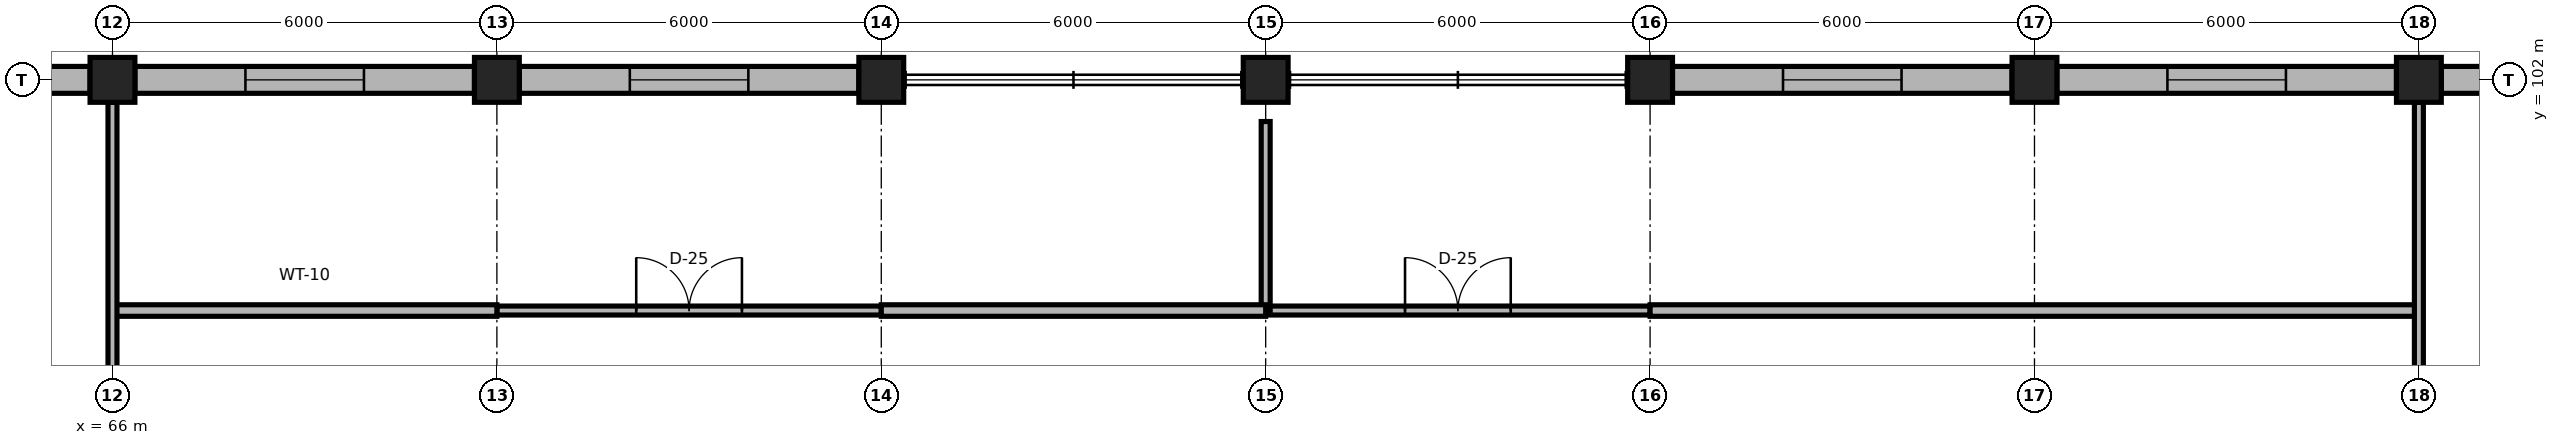
"""IFC4 building model, lengths in metres.
Left out: names, types, materials, properties, quantities, classifications, styles, units other than length and angle.
Written with IfcOpenShell. Run it as: python <this file> out.ifc"""

import sys

from ifc_helpers import new_model, si_unit, direction, frame, frame_2d, origin, origin_2d, place, context, subcontext, project, spatial, rectangle, extrude, element, fill, save


model = new_model("IFC4")
c1 = context("Model", 3, precision=1e-05, world=origin(), true_north=direction((0.0, 1.0)))
c2 = subcontext(c1, "Body", "Model", "MODEL_VIEW")
j1 = project(units=[si_unit("LENGTHUNIT", "METRE"), si_unit("PLANEANGLEUNIT", "RADIAN")], contexts=[c1])
p1 = place(None, origin())
s1 = spatial("IfcSite", under=j1, at=p1, CompositionType="ELEMENT")
p2 = place(p1, origin())
s2 = spatial("IfcBuilding", under=s1, at=p2, CompositionType="ELEMENT")
p3 = place(p2, frame((0.0, 0.0, 36.6)))
s3 = spatial("IfcBuildingStorey", under=s2, at=p3, CompositionType="ELEMENT", Elevation=36.6)
for number, where, z_axis, x_axis in (
    (1, (66.0, 102.0, 0.0), (0.0, 0.0, 1.0), (1.0, 0.0, 0.0)),
    (2, (72.0, 102.0, 0.0), (0.0, 0.0, 1.0), (1.0, 0.0, 0.0)),
    (3, (78.0, 102.0, 0.0), (0.0, 0.0, 1.0), (1.0, 0.0, 0.0)),
    (4, (84.0, 102.0, 0.0), (0.0, 0.0, 1.0), (1.0, 0.0, 0.0)),
    (5, (90.0, 102.0, 0.0), (0.0, 0.0, 1.0), (1.0, 0.0, 0.0)),
    (6, (96.0, 102.0, 0.0), (0.0, 0.0, 1.0), (1.0, 0.0, 0.0)),
    (7, (102.0, 102.0, 0.0), (0.0, 0.0, 1.0), (1.0, 0.0, 0.0)),
):
    element("IfcColumn", number, at=place(p3, frame(where, z_axis=z_axis, x_axis=x_axis)), inside=s3, PredefinedType="COLUMN", context=c2, shape_type="SweptSolid", body=[
        extrude(rectangle(XDim=0.7, YDim=0.7, at=origin_2d()), origin(), (0.0, 0.0, 1.0), 3.9),
    ])
p4 = place(p3, frame((60.35, 102.0, 0.0), z_axis=(0.0, 0.0, 1.0), x_axis=(1.0, 0.0, 0.0)))
e8 = element("IfcWall", 8, at=p4, inside=s3, PredefinedType="SOLIDWALL", context=c2, shape_type="SweptSolid", body=[
    extrude(rectangle(XDim=5.3, YDim=0.42, at=frame_2d((2.65, 0.0))), origin(), (0.0, 0.0, 1.0), 3.32),
])
p5 = place(p4, frame((1.725, 0.0, 0.85)))
e9 = element("IfcOpeningElement", 9, at=p5, cuts=e8, PredefinedType="OPENING", context=c2, shape_type="SweptSolid", body=[
    extrude(rectangle(XDim=1.85, YDim=2.0, at=frame_2d((0.925, 1.0))), frame((0.0, 0.225, 0.0), z_axis=(0.0, -1.0, 0.0), x_axis=(1.0, 0.0, 0.0)), (0.0, 0.0, 1.0), 0.45),
])
p6 = place(p3, frame((66.35, 102.0, 0.0), z_axis=(0.0, 0.0, 1.0), x_axis=(1.0, 0.0, 0.0)))
e10 = element("IfcWall", 10, at=p6, inside=s3, PredefinedType="SOLIDWALL", context=c2, shape_type="SweptSolid", body=[
    extrude(rectangle(XDim=5.3, YDim=0.42, at=frame_2d((2.65, 0.0))), origin(), (0.0, 0.0, 1.0), 3.32),
])
p7 = place(p6, frame((1.725, 0.0, 0.85)))
e11 = element("IfcOpeningElement", 11, at=p7, cuts=e10, PredefinedType="OPENING", context=c2, shape_type="SweptSolid", body=[
    extrude(rectangle(XDim=1.85, YDim=2.0, at=frame_2d((0.925, 1.0))), frame((0.0, 0.225, 0.0), z_axis=(0.0, -1.0, 0.0), x_axis=(1.0, 0.0, 0.0)), (0.0, 0.0, 1.0), 0.45),
])
p8 = place(p3, frame((72.35, 102.0, 0.0), z_axis=(0.0, 0.0, 1.0), x_axis=(1.0, 0.0, 0.0)))
e12 = element("IfcWall", 12, at=p8, inside=s3, PredefinedType="SOLIDWALL", context=c2, shape_type="SweptSolid", body=[
    extrude(rectangle(XDim=5.3, YDim=0.42, at=frame_2d((2.65, 0.0))), origin(), (0.0, 0.0, 1.0), 3.32),
])
p9 = place(p8, frame((1.725, 0.0, 0.85)))
e13 = element("IfcOpeningElement", 13, at=p9, cuts=e12, PredefinedType="OPENING", context=c2, shape_type="SweptSolid", body=[
    extrude(rectangle(XDim=1.85, YDim=2.0, at=frame_2d((0.925, 1.0))), frame((0.0, 0.225, 0.0), z_axis=(0.0, -1.0, 0.0), x_axis=(1.0, 0.0, 0.0)), (0.0, 0.0, 1.0), 0.45),
])
p10 = place(p3, frame((90.35, 102.0, 0.0), z_axis=(0.0, 0.0, 1.0), x_axis=(1.0, 0.0, 0.0)))
e14 = element("IfcWall", 14, at=p10, inside=s3, PredefinedType="SOLIDWALL", context=c2, shape_type="SweptSolid", body=[
    extrude(rectangle(XDim=5.3, YDim=0.42, at=frame_2d((2.65, 0.0))), origin(), (0.0, 0.0, 1.0), 3.32),
])
p11 = place(p10, frame((1.725, 0.0, 0.85)))
e15 = element("IfcOpeningElement", 15, at=p11, cuts=e14, PredefinedType="OPENING", context=c2, shape_type="SweptSolid", body=[
    extrude(rectangle(XDim=1.85, YDim=2.0, at=frame_2d((0.925, 1.0))), frame((0.0, 0.225, 0.0), z_axis=(0.0, -1.0, 0.0), x_axis=(1.0, 0.0, 0.0)), (0.0, 0.0, 1.0), 0.45),
])
p12 = place(p3, frame((96.35, 102.0, 0.0), z_axis=(0.0, 0.0, 1.0), x_axis=(1.0, 0.0, 0.0)))
e16 = element("IfcWall", 16, at=p12, inside=s3, PredefinedType="SOLIDWALL", context=c2, shape_type="SweptSolid", body=[
    extrude(rectangle(XDim=5.3, YDim=0.42, at=frame_2d((2.65, 0.0))), origin(), (0.0, 0.0, 1.0), 3.32),
])
p13 = place(p12, frame((1.725, 0.0, 0.85)))
e17 = element("IfcOpeningElement", 17, at=p13, cuts=e16, PredefinedType="OPENING", context=c2, shape_type="SweptSolid", body=[
    extrude(rectangle(XDim=1.85, YDim=2.0, at=frame_2d((0.925, 1.0))), frame((0.0, 0.225, 0.0), z_axis=(0.0, -1.0, 0.0), x_axis=(1.0, 0.0, 0.0)), (0.0, 0.0, 1.0), 0.45),
])
p14 = place(p3, frame((102.35, 102.0, 0.0), z_axis=(0.0, 0.0, 1.0), x_axis=(1.0, 0.0, 0.0)))
e18 = element("IfcWall", 18, at=p14, inside=s3, PredefinedType="SOLIDWALL", context=c2, shape_type="SweptSolid", body=[
    extrude(rectangle(XDim=5.3, YDim=0.42, at=frame_2d((2.65, 0.0))), origin(), (0.0, 0.0, 1.0), 3.32),
])
p15 = place(p14, frame((1.725, 0.0, 0.85)))
e19 = element("IfcOpeningElement", 19, at=p15, cuts=e18, PredefinedType="OPENING", context=c2, shape_type="SweptSolid", body=[
    extrude(rectangle(XDim=1.85, YDim=2.0, at=frame_2d((0.925, 1.0))), frame((0.0, 0.225, 0.0), z_axis=(0.0, -1.0, 0.0), x_axis=(1.0, 0.0, 0.0)), (0.0, 0.0, 1.0), 0.45),
])
p16 = place(p3, frame((72.0, 98.4, 0.0), z_axis=(0.0, 0.0, 1.0), x_axis=(1.0, 0.0, 0.0)))
e20 = element("IfcWall", 20, at=p16, inside=s3, PredefinedType="PARTITIONING", context=c2, shape_type="SweptSolid", body=[
    extrude(rectangle(XDim=6.0, YDim=0.14, at=frame_2d((3.0, 0.0))), origin(), (0.0, 0.0, 1.0), 3.74),
])
p17 = place(p16, frame((2.175, 0.0, 0.0)))
e21 = element("IfcOpeningElement", 21, at=p17, cuts=e20, PredefinedType="OPENING", context=c2, shape_type="SweptSolid", body=[
    extrude(rectangle(XDim=1.65, YDim=2.35, at=frame_2d((0.825, 1.175))), frame((0.0, 0.085, 0.0), z_axis=(0.0, -1.0, 0.0), x_axis=(1.0, 0.0, 0.0)), (0.0, 0.0, 1.0), 0.17),
])
p18 = place(p3, frame((84.0, 98.4, 0.0), z_axis=(0.0, 0.0, 1.0), x_axis=(1.0, 0.0, 0.0)))
e22 = element("IfcWall", 22, at=p18, inside=s3, PredefinedType="PARTITIONING", context=c2, shape_type="SweptSolid", body=[
    extrude(rectangle(XDim=6.0, YDim=0.14, at=frame_2d((3.0, 0.0))), origin(), (0.0, 0.0, 1.0), 3.74),
])
p19 = place(p18, frame((2.175, 0.0, 0.0)))
e23 = element("IfcOpeningElement", 23, at=p19, cuts=e22, PredefinedType="OPENING", context=c2, shape_type="SweptSolid", body=[
    extrude(rectangle(XDim=1.65, YDim=2.35, at=frame_2d((0.825, 1.175))), frame((0.0, 0.085, 0.0), z_axis=(0.0, -1.0, 0.0), x_axis=(1.0, 0.0, 0.0)), (0.0, 0.0, 1.0), 0.17),
])
p20 = place(p3, frame((84.0, 98.4, 0.0), z_axis=(0.0, 0.0, 1.0), x_axis=(0.0, 1.0, 0.0)))
e24 = element("IfcWall", 24, at=p20, inside=s3, PredefinedType="PARTITIONING", context=c2, shape_type="SweptSolid", body=[
    extrude(rectangle(XDim=2.95, YDim=0.14, at=frame_2d((1.475, 0.0))), origin(), (0.0, 0.0, 1.0), 3.348),
])
for number, where, z_axis, x_axis in (
    (25, (66.0, 98.4, 0.0), (0.0, 0.0, 1.0), (1.0, 0.0, 0.0)),
    (26, (78.0, 98.4, 0.0), (0.0, 0.0, 1.0), (1.0, 0.0, 0.0)),
):
    element("IfcWall", number, at=place(p3, frame(where, z_axis=z_axis, x_axis=x_axis)), inside=s3, PredefinedType="PARTITIONING", context=c2, shape_type="SweptSolid", body=[
        extrude(rectangle(XDim=6.0, YDim=0.18, at=frame_2d((3.0, 0.0))), origin(), (0.0, 0.0, 1.0), 3.74),
    ])
p21 = place(p3, frame((90.0, 98.4, 0.0), z_axis=(0.0, 0.0, 1.0), x_axis=(1.0, 0.0, 0.0)))
e27 = element("IfcWall", 27, at=p21, inside=s3, PredefinedType="PARTITIONING", context=c2, shape_type="SweptSolid", body=[
    extrude(rectangle(XDim=12.0, YDim=0.18, at=frame_2d((6.0, 0.0))), origin(), (0.0, 0.0, 1.0), 3.74),
])
for number, where, z_axis, x_axis in (
    (28, (66.0, 96.35, 0.0), (0.0, 0.0, 1.0), (0.0, 1.0, 0.0)),
    (29, (102.0, 96.35, 0.0), (0.0, 0.0, 1.0), (0.0, 1.0, 0.0)),
):
    element("IfcWall", number, at=place(p3, frame(where, z_axis=z_axis, x_axis=x_axis)), inside=s3, PredefinedType="PARTITIONING", context=c2, shape_type="SweptSolid", body=[
        extrude(rectangle(XDim=5.3, YDim=0.14, at=frame_2d((2.65, 0.0))), origin(), (0.0, 0.0, 1.0), 3.348),
    ])
p22 = place(p7, origin())
e30 = element("IfcWindow", 30, at=p22, inside=s3, PartitioningType="SINGLE_PANEL", PredefinedType="WINDOW", context=c2, shape_type="SweptSolid", body=[
    extrude(rectangle(XDim=1.85, YDim=2.0, at=frame_2d((0.925, 1.0))), frame((0.0, 0.03, 0.0), z_axis=(0.0, -1.0, 0.0), x_axis=(1.0, 0.0, 0.0)), (0.0, 0.0, 1.0), 0.06),
])
fill(e11, e30)
p23 = place(p9, origin())
e31 = element("IfcWindow", 31, at=p23, inside=s3, PartitioningType="SINGLE_PANEL", PredefinedType="WINDOW", context=c2, shape_type="SweptSolid", body=[
    extrude(rectangle(XDim=1.85, YDim=2.0, at=frame_2d((0.925, 1.0))), frame((0.0, 0.03, 0.0), z_axis=(0.0, -1.0, 0.0), x_axis=(1.0, 0.0, 0.0)), (0.0, 0.0, 1.0), 0.06),
])
fill(e13, e31)
p24 = place(p11, origin())
e32 = element("IfcWindow", 32, at=p24, inside=s3, PartitioningType="SINGLE_PANEL", PredefinedType="WINDOW", context=c2, shape_type="SweptSolid", body=[
    extrude(rectangle(XDim=1.85, YDim=2.0, at=frame_2d((0.925, 1.0))), frame((0.0, 0.03, 0.0), z_axis=(0.0, -1.0, 0.0), x_axis=(1.0, 0.0, 0.0)), (0.0, 0.0, 1.0), 0.06),
])
fill(e15, e32)
p25 = place(p13, origin())
e33 = element("IfcWindow", 33, at=p25, inside=s3, PartitioningType="SINGLE_PANEL", PredefinedType="WINDOW", context=c2, shape_type="SweptSolid", body=[
    extrude(rectangle(XDim=1.85, YDim=2.0, at=frame_2d((0.925, 1.0))), frame((0.0, 0.03, 0.0), z_axis=(0.0, -1.0, 0.0), x_axis=(1.0, 0.0, 0.0)), (0.0, 0.0, 1.0), 0.06),
])
fill(e17, e33)
p26 = place(p17, origin())
e34 = element("IfcDoor", 34, at=p26, inside=s3, OperationType="DOUBLE_DOOR_SINGLE_SWING", PredefinedType="DOOR", context=c2, shape_type="SweptSolid", body=[
    extrude(rectangle(XDim=1.65, YDim=2.35, at=frame_2d((0.825, 1.175))), frame((0.0, 0.025, 0.0), z_axis=(0.0, -1.0, 0.0), x_axis=(1.0, 0.0, 0.0)), (0.0, 0.0, 1.0), 0.05),
])
fill(e21, e34)
p27 = place(p19, origin())
e35 = element("IfcDoor", 35, at=p27, inside=s3, OperationType="DOUBLE_DOOR_SINGLE_SWING", PredefinedType="DOOR", context=c2, shape_type="SweptSolid", body=[
    extrude(rectangle(XDim=1.65, YDim=2.35, at=frame_2d((0.825, 1.175))), frame((0.0, 0.025, 0.0), z_axis=(0.0, -1.0, 0.0), x_axis=(1.0, 0.0, 0.0)), (0.0, 0.0, 1.0), 0.05),
])
fill(e23, e35)
save(model, sys.argv[1])
